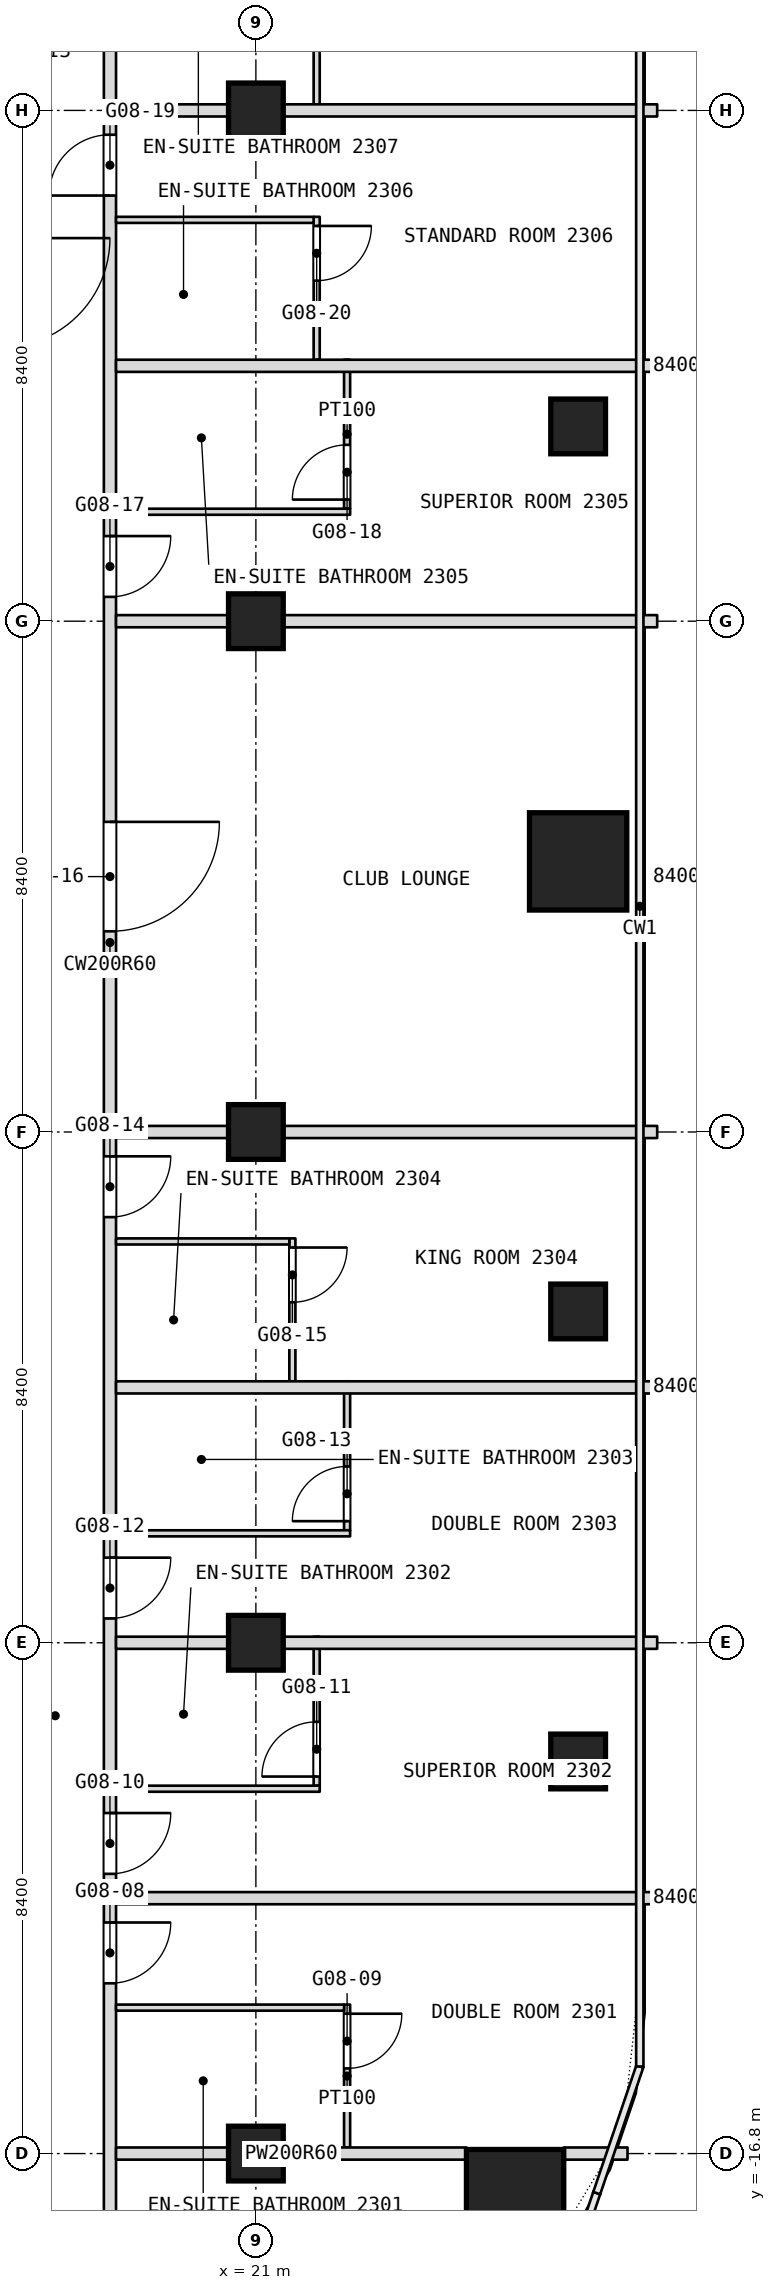
"""IFC4 building model, lengths in metres.
Left out: names, types, materials, properties, quantities, classifications, styles, units other than length and angle.
Written with IfcOpenShell. Run it as: python <this file> out.ifc"""

import sys

from ifc_helpers import new_model, si_unit, direction, frame, frame_2d, origin, origin_2d, place, context, subcontext, project, spatial, rectangle, extrude, element, fill, save


model = new_model("IFC4")
c1 = context("Model", 3, precision=1e-05, world=origin(), true_north=direction((0.0, 1.0)))
c2 = subcontext(c1, "Body", "Model", "MODEL_VIEW")
j1 = project(units=[si_unit("LENGTHUNIT", "METRE"), si_unit("PLANEANGLEUNIT", "RADIAN")], contexts=[c1])
p1 = place(None, origin())
s1 = spatial("IfcSite", under=j1, at=p1, CompositionType="ELEMENT")
p2 = place(p1, origin())
s2 = spatial("IfcBuilding", under=s1, at=p2, CompositionType="ELEMENT")
p3 = place(p2, frame((0.0, 0.0, 108.5)))
s3 = spatial("IfcBuildingStorey", under=s2, at=p3, CompositionType="ELEMENT", Elevation=108.5)
for number, where, z_axis, x_axis in (
    (1, (25.263, -17.533, 0.0), (0.0, 0.0, 1.0), (1.0, 0.0, 0.0)),
    (2, (26.3, 4.45, 0.0), (0.0, 0.0, 1.0), (1.0, 0.0, 0.0)),
):
    element("IfcColumn", number, at=place(p3, frame(where, z_axis=z_axis, x_axis=x_axis)), inside=s3, PredefinedType="COLUMN", context=c2, shape_type="SweptSolid", body=[
        extrude(rectangle(XDim=1.6, YDim=1.6, at=origin_2d()), origin(), (0.0, 0.0, 1.0), 3.6),
    ])
for number, where, z_axis, x_axis in (
    (3, (21.0, -16.8, 0.0), (0.0, 0.0, 1.0), (1.0, 0.0, 0.0)),
    (4, (21.0, -8.4, 0.0), (0.0, 0.0, 1.0), (1.0, 0.0, 0.0)),
    (5, (21.0, 0.0, 0.0), (0.0, 0.0, 1.0), (1.0, 0.0, 0.0)),
    (6, (21.0, 8.4, 0.0), (0.0, 0.0, 1.0), (1.0, 0.0, 0.0)),
    (7, (21.0, 16.8, 0.0), (0.0, 0.0, 1.0), (1.0, 0.0, 0.0)),
    (8, (26.3, 11.603, 0.0), (0.0, 0.0, 1.0), (1.0, 0.0, 0.0)),
    (9, (26.3, -2.951, 0.0), (0.0, 0.0, 1.0), (1.0, 0.0, 0.0)),
    (10, (26.3, -10.352, 0.0), (0.0, 0.0, 1.0), (1.0, 0.0, 0.0)),
):
    element("IfcColumn", number, at=place(p3, frame(where, z_axis=z_axis, x_axis=x_axis)), inside=s3, PredefinedType="COLUMN", context=c2, shape_type="SweptSolid", body=[
        extrude(rectangle(XDim=0.9, YDim=0.9, at=origin_2d()), origin(), (0.0, 0.0, 1.0), 3.6),
    ])
p4 = place(p3, frame((22.5, -16.7, 0.0), z_axis=(0.0, 0.0, 1.0), x_axis=(0.0, 1.0, 0.0)))
e11 = element("IfcWall", 11, at=p4, inside=s3, PredefinedType="PARTITIONING", context=c2, shape_type="SweptSolid", body=[
    extrude(rectangle(XDim=2.35, YDim=0.1, at=frame_2d((1.175, 0.0))), origin(), (0.0, 0.0, 1.0), 3.34),
])
p5 = place(p4, frame((1.3, 0.0, 0.0)))
e12 = element("IfcOpeningElement", 12, at=p5, cuts=e11, PredefinedType="OPENING", context=c2, shape_type="SweptSolid", body=[
    extrude(rectangle(XDim=0.9, YDim=2.1, at=frame_2d((0.45, 1.05))), frame((0.0, 0.05, 0.0), z_axis=(0.0, -1.0, 0.0), x_axis=(1.0, 0.0, 0.0)), (0.0, 0.0, 1.0), 0.1),
])
p6 = place(p3, frame((22.5, -6.55, 0.0), z_axis=(0.0, 0.0, 1.0), x_axis=(0.0, 1.0, 0.0)))
e13 = element("IfcWall", 13, at=p6, inside=s3, PredefinedType="PARTITIONING", context=c2, shape_type="SweptSolid", body=[
    extrude(rectangle(XDim=2.45, YDim=0.1, at=frame_2d((1.225, 0.0))), origin(), (0.0, 0.0, 1.0), 3.34),
])
p7 = place(p6, frame((0.15, 0.0, 0.0)))
e14 = element("IfcOpeningElement", 14, at=p7, cuts=e13, PredefinedType="OPENING", context=c2, shape_type="SweptSolid", body=[
    extrude(rectangle(XDim=0.9, YDim=2.1, at=frame_2d((0.45, 1.05))), frame((0.0, 0.05, 0.0), z_axis=(0.0, -1.0, 0.0), x_axis=(1.0, 0.0, 0.0)), (0.0, 0.0, 1.0), 0.1),
])
p8 = place(p3, frame((22.5, 10.25, 0.0), z_axis=(0.0, 0.0, 1.0), x_axis=(0.0, 1.0, 0.0)))
e15 = element("IfcWall", 15, at=p8, inside=s3, PredefinedType="PARTITIONING", context=c2, shape_type="SweptSolid", body=[
    extrude(rectangle(XDim=2.45, YDim=0.1, at=frame_2d((1.225, 0.0))), origin(), (0.0, 0.0, 1.0), 3.34),
])
p9 = place(p8, frame((0.15, 0.0, 0.0)))
e16 = element("IfcOpeningElement", 16, at=p9, cuts=e15, PredefinedType="OPENING", context=c2, shape_type="SweptSolid", body=[
    extrude(rectangle(XDim=0.9, YDim=2.1, at=frame_2d((0.45, 1.05))), frame((0.0, 0.05, 0.0), z_axis=(0.0, -1.0, 0.0), x_axis=(1.0, 0.0, 0.0)), (0.0, 0.0, 1.0), 0.1),
])
p10 = place(p3, frame((22.0, -10.75, 0.0), z_axis=(0.0, 0.0, 1.0), x_axis=(0.0, 1.0, 0.0)))
e17 = element("IfcWall", 17, at=p10, inside=s3, PredefinedType="PARTITIONING", context=c2, shape_type="SweptSolid", body=[
    extrude(rectangle(XDim=2.45, YDim=0.1, at=frame_2d((1.225, 0.0))), origin(), (0.0, 0.0, 1.0), 3.34),
])
p11 = place(p10, frame((0.15, 0.0, 0.0)))
e18 = element("IfcOpeningElement", 18, at=p11, cuts=e17, PredefinedType="OPENING", context=c2, shape_type="SweptSolid", body=[
    extrude(rectangle(XDim=0.9, YDim=2.1, at=frame_2d((0.45, 1.05))), frame((0.0, 0.05, 0.0), z_axis=(0.0, -1.0, 0.0), x_axis=(1.0, 0.0, 0.0)), (0.0, 0.0, 1.0), 0.1),
])
p12 = place(p3, frame((22.0, 12.7, 0.0), z_axis=(0.0, 0.0, 1.0), x_axis=(0.0, 1.0, 0.0)))
e19 = element("IfcWall", 19, at=p12, inside=s3, PredefinedType="PARTITIONING", context=c2, shape_type="SweptSolid", body=[
    extrude(rectangle(XDim=2.35, YDim=0.1, at=frame_2d((1.175, 0.0))), origin(), (0.0, 0.0, 1.0), 3.34),
])
p13 = place(p12, frame((1.3, 0.0, 0.0)))
e20 = element("IfcOpeningElement", 20, at=p13, cuts=e19, PredefinedType="OPENING", context=c2, shape_type="SweptSolid", body=[
    extrude(rectangle(XDim=0.9, YDim=2.1, at=frame_2d((0.45, 1.05))), frame((0.0, 0.05, 0.0), z_axis=(0.0, -1.0, 0.0), x_axis=(1.0, 0.0, 0.0)), (0.0, 0.0, 1.0), 0.1),
])
p14 = place(p3, frame((22.0, 16.9, 0.0), z_axis=(0.0, 0.0, 1.0), x_axis=(0.0, 1.0, 0.0)))
e21 = element("IfcWall", 21, at=p14, inside=s3, PredefinedType="PARTITIONING", context=c2, shape_type="SweptSolid", body=[
    extrude(rectangle(XDim=3.55, YDim=0.1, at=frame_2d((1.775, 0.0))), origin(), (0.0, 0.0, 1.0), 3.34),
])
p15 = place(p14, frame((2.5, 0.0, 0.0)))
e22 = element("IfcOpeningElement", 22, at=p15, cuts=e21, PredefinedType="OPENING", context=c2, shape_type="SweptSolid", body=[
    extrude(rectangle(XDim=0.9, YDim=2.1, at=frame_2d((0.45, 1.05))), frame((0.0, 0.05, 0.0), z_axis=(0.0, -1.0, 0.0), x_axis=(1.0, 0.0, 0.0)), (0.0, 0.0, 1.0), 0.1),
])
p16 = place(p3, frame((21.6, -4.1, 0.0), z_axis=(0.0, 0.0, 1.0), x_axis=(0.0, 1.0, 0.0)))
e23 = element("IfcWall", 23, at=p16, inside=s3, PredefinedType="PARTITIONING", context=c2, shape_type="SweptSolid", body=[
    extrude(rectangle(XDim=2.35, YDim=0.1, at=frame_2d((1.175, 0.0))), origin(), (0.0, 0.0, 1.0), 3.34),
])
p17 = place(p16, frame((1.3, 0.0, 0.0)))
e24 = element("IfcOpeningElement", 24, at=p17, cuts=e23, PredefinedType="OPENING", context=c2, shape_type="SweptSolid", body=[
    extrude(rectangle(XDim=0.9, YDim=2.1, at=frame_2d((0.45, 1.05))), frame((0.0, 0.05, 0.0), z_axis=(0.0, -1.0, 0.0), x_axis=(1.0, 0.0, 0.0)), (0.0, 0.0, 1.0), 0.1),
])
p18 = place(p3, frame((18.6, -21.708, 0.0), z_axis=(0.0, 0.0, 1.0), x_axis=(0.0, 1.0, 0.0)))
e25 = element("IfcWall", 25, at=p18, inside=s3, PredefinedType="PARTITIONING", context=c2, shape_type="SweptSolid", body=[
    extrude(rectangle(XDim=49.648, YDim=0.2, at=frame_2d((24.824, 0.0))), origin(), (0.0, 0.0, 1.0), 3.34),
])
p19 = place(p18, frame((2.204, 0.0, 0.0)))
e26 = element("IfcOpeningElement", 26, at=p19, cuts=e25, PredefinedType="OPENING", context=c2, shape_type="SweptSolid", body=[
    extrude(rectangle(XDim=1.0, YDim=2.1, at=frame_2d((0.5, 1.05))), frame((0.0, 0.1, 0.0), z_axis=(0.0, -1.0, 0.0), x_axis=(1.0, 0.0, 0.0)), (0.0, 0.0, 1.0), 0.2),
])
p20 = place(p18, frame((7.708, 0.0, 0.0)))
e27 = element("IfcOpeningElement", 27, at=p20, cuts=e25, PredefinedType="OPENING", context=c2, shape_type="SweptSolid", body=[
    extrude(rectangle(XDim=1.0, YDim=2.1, at=frame_2d((0.5, 1.05))), frame((0.0, 0.1, 0.0), z_axis=(0.0, -1.0, 0.0), x_axis=(1.0, 0.0, 0.0)), (0.0, 0.0, 1.0), 0.2),
])
p21 = place(p18, frame((9.508, 0.0, 0.0)))
e28 = element("IfcOpeningElement", 28, at=p21, cuts=e25, PredefinedType="OPENING", context=c2, shape_type="SweptSolid", body=[
    extrude(rectangle(XDim=1.0, YDim=2.1, at=frame_2d((0.5, 1.05))), frame((0.0, 0.1, 0.0), z_axis=(0.0, -1.0, 0.0), x_axis=(1.0, 0.0, 0.0)), (0.0, 0.0, 1.0), 0.2),
])
p22 = place(p18, frame((13.708, 0.0, 0.0)))
e29 = element("IfcOpeningElement", 29, at=p22, cuts=e25, PredefinedType="OPENING", context=c2, shape_type="SweptSolid", body=[
    extrude(rectangle(XDim=1.0, YDim=2.1, at=frame_2d((0.5, 1.05))), frame((0.0, 0.1, 0.0), z_axis=(0.0, -1.0, 0.0), x_axis=(1.0, 0.0, 0.0)), (0.0, 0.0, 1.0), 0.2),
])
p23 = place(p18, frame((20.308, 0.0, 0.0)))
e30 = element("IfcOpeningElement", 30, at=p23, cuts=e25, PredefinedType="OPENING", context=c2, shape_type="SweptSolid", body=[
    extrude(rectangle(XDim=1.0, YDim=2.1, at=frame_2d((0.5, 1.05))), frame((0.0, 0.1, 0.0), z_axis=(0.0, -1.0, 0.0), x_axis=(1.0, 0.0, 0.0)), (0.0, 0.0, 1.0), 0.2),
])
p24 = place(p18, frame((25.008, 0.0, 0.0)))
e31 = element("IfcOpeningElement", 31, at=p24, cuts=e25, PredefinedType="OPENING", context=c2, shape_type="SweptSolid", body=[
    extrude(rectangle(XDim=1.8, YDim=2.1, at=frame_2d((0.9, 1.05))), frame((0.0, 0.1, 0.0), z_axis=(0.0, -1.0, 0.0), x_axis=(1.0, 0.0, 0.0)), (0.0, 0.0, 1.0), 0.2),
])
p25 = place(p18, frame((30.508, 0.0, 0.0)))
e32 = element("IfcOpeningElement", 32, at=p25, cuts=e25, PredefinedType="OPENING", context=c2, shape_type="SweptSolid", body=[
    extrude(rectangle(XDim=1.0, YDim=2.1, at=frame_2d((0.5, 1.05))), frame((0.0, 0.1, 0.0), z_axis=(0.0, -1.0, 0.0), x_axis=(1.0, 0.0, 0.0)), (0.0, 0.0, 1.0), 0.2),
])
p26 = place(p18, frame((37.108, 0.0, 0.0)))
e33 = element("IfcOpeningElement", 33, at=p26, cuts=e25, PredefinedType="OPENING", context=c2, shape_type="SweptSolid", body=[
    extrude(rectangle(XDim=1.0, YDim=2.1, at=frame_2d((0.5, 1.05))), frame((0.0, 0.1, 0.0), z_axis=(0.0, -1.0, 0.0), x_axis=(1.0, 0.0, 0.0)), (0.0, 0.0, 1.0), 0.2),
])
p27 = place(p18, frame((42.608, 0.0, 0.0)))
e34 = element("IfcOpeningElement", 34, at=p27, cuts=e25, PredefinedType="OPENING", context=c2, shape_type="SweptSolid", body=[
    extrude(rectangle(XDim=1.0, YDim=2.1, at=frame_2d((0.5, 1.05))), frame((0.0, 0.1, 0.0), z_axis=(0.0, -1.0, 0.0), x_axis=(1.0, 0.0, 0.0)), (0.0, 0.0, 1.0), 0.2),
])
p28 = place(p18, frame((44.608, 0.0, 0.0)))
e35 = element("IfcOpeningElement", 35, at=p28, cuts=e25, PredefinedType="OPENING", context=c2, shape_type="SweptSolid", body=[
    extrude(rectangle(XDim=1.0, YDim=2.1, at=frame_2d((0.5, 1.05))), frame((0.0, 0.1, 0.0), z_axis=(0.0, -1.0, 0.0), x_axis=(1.0, 0.0, 0.0)), (0.0, 0.0, 1.0), 0.2),
])
p29 = place(p3, frame((18.7, -16.8, 0.0), z_axis=(0.0, 0.0, 1.0), x_axis=(1.0, 0.0, 0.0)))
e36 = element("IfcWall", 36, at=p29, inside=s3, PredefinedType="PARTITIONING", context=c2, shape_type="SweptSolid", body=[
    extrude(rectangle(XDim=5.763, YDim=0.2, at=frame_2d((2.881, 0.0))), origin(), (0.0, 0.0, 1.0), 2.89),
])
p30 = place(p3, frame((26.063, -16.8, 0.0), z_axis=(0.0, 0.0, 1.0), x_axis=(1.0, 0.0, 0.0)))
e37 = element("IfcWall", 37, at=p30, inside=s3, PredefinedType="PARTITIONING", context=c2, shape_type="SweptSolid", body=[
    extrude(rectangle(XDim=1.049, YDim=0.2, at=frame_2d((0.524, 0.0))), origin(), (0.0, 0.0, 1.0), 3.34),
])
p31 = place(p3, frame((18.7, -14.4, 0.0), z_axis=(0.0, 0.0, 1.0), x_axis=(1.0, 0.0, 0.0)))
e38 = element("IfcWall", 38, at=p31, inside=s3, PredefinedType="PARTITIONING", context=c2, shape_type="SweptSolid", body=[
    extrude(rectangle(XDim=3.75, YDim=0.1, at=frame_2d((1.875, 0.0))), origin(), (0.0, 0.0, 1.0), 3.34),
])
p32 = place(p3, frame((18.7, -12.6, 0.0), z_axis=(0.0, 0.0, 1.0), x_axis=(1.0, 0.0, 0.0)))
e39 = element("IfcWall", 39, at=p32, inside=s3, PredefinedType="PARTITIONING", context=c2, shape_type="SweptSolid", body=[
    extrude(rectangle(XDim=8.9, YDim=0.2, at=frame_2d((4.45, 0.0))), origin(), (0.0, 0.0, 1.0), 3.34),
])
p33 = place(p3, frame((18.7, -10.8, 0.0), z_axis=(0.0, 0.0, 1.0), x_axis=(1.0, 0.0, 0.0)))
e40 = element("IfcWall", 40, at=p33, inside=s3, PredefinedType="PARTITIONING", context=c2, shape_type="SweptSolid", body=[
    extrude(rectangle(XDim=3.35, YDim=0.1, at=frame_2d((1.675, 0.0))), origin(), (0.0, 0.0, 1.0), 3.34),
])
p34 = place(p3, frame((18.7, -8.4, 0.0), z_axis=(0.0, 0.0, 1.0), x_axis=(1.0, 0.0, 0.0)))
e41 = element("IfcWall", 41, at=p34, inside=s3, PredefinedType="PARTITIONING", context=c2, shape_type="SweptSolid", body=[
    extrude(rectangle(XDim=8.9, YDim=0.2, at=frame_2d((4.45, 0.0))), origin(), (0.0, 0.0, 1.0), 2.89),
])
p35 = place(p3, frame((18.7, -6.6, 0.0), z_axis=(0.0, 0.0, 1.0), x_axis=(1.0, 0.0, 0.0)))
e42 = element("IfcWall", 42, at=p35, inside=s3, PredefinedType="PARTITIONING", context=c2, shape_type="SweptSolid", body=[
    extrude(rectangle(XDim=3.85, YDim=0.1, at=frame_2d((1.925, 0.0))), origin(), (0.0, 0.0, 1.0), 3.34),
])
p36 = place(p3, frame((18.7, -4.2, 0.0), z_axis=(0.0, 0.0, 1.0), x_axis=(1.0, 0.0, 0.0)))
e43 = element("IfcWall", 43, at=p36, inside=s3, PredefinedType="PARTITIONING", context=c2, shape_type="SweptSolid", body=[
    extrude(rectangle(XDim=8.9, YDim=0.2, at=frame_2d((4.45, 0.0))), origin(), (0.0, 0.0, 1.0), 3.34),
])
p37 = place(p3, frame((18.7, -1.8, 0.0), z_axis=(0.0, 0.0, 1.0), x_axis=(1.0, 0.0, 0.0)))
e44 = element("IfcWall", 44, at=p37, inside=s3, PredefinedType="PARTITIONING", context=c2, shape_type="SweptSolid", body=[
    extrude(rectangle(XDim=2.85, YDim=0.1, at=frame_2d((1.425, 0.0))), origin(), (0.0, 0.0, 1.0), 3.34),
])
for number, where, z_axis, x_axis in (
    (45, (18.7, 0.0, 0.0), (0.0, 0.0, 1.0), (1.0, 0.0, 0.0)),
    (46, (18.7, 8.4, 0.0), (0.0, 0.0, 1.0), (1.0, 0.0, 0.0)),
):
    element("IfcWall", number, at=place(p3, frame(where, z_axis=z_axis, x_axis=x_axis)), inside=s3, PredefinedType="PARTITIONING", context=c2, shape_type="SweptSolid", body=[
        extrude(rectangle(XDim=8.9, YDim=0.2, at=frame_2d((4.45, 0.0))), origin(), (0.0, 0.0, 1.0), 2.89),
    ])
p38 = place(p3, frame((18.7, 10.2, 0.0), z_axis=(0.0, 0.0, 1.0), x_axis=(1.0, 0.0, 0.0)))
e47 = element("IfcWall", 47, at=p38, inside=s3, PredefinedType="PARTITIONING", context=c2, shape_type="SweptSolid", body=[
    extrude(rectangle(XDim=3.85, YDim=0.1, at=frame_2d((1.925, 0.0))), origin(), (0.0, 0.0, 1.0), 3.34),
])
p39 = place(p3, frame((18.7, 12.6, 0.0), z_axis=(0.0, 0.0, 1.0), x_axis=(1.0, 0.0, 0.0)))
e48 = element("IfcWall", 48, at=p39, inside=s3, PredefinedType="PARTITIONING", context=c2, shape_type="SweptSolid", body=[
    extrude(rectangle(XDim=8.9, YDim=0.2, at=frame_2d((4.45, 0.0))), origin(), (0.0, 0.0, 1.0), 3.34),
])
p40 = place(p3, frame((18.7, 15.0, 0.0), z_axis=(0.0, 0.0, 1.0), x_axis=(1.0, 0.0, 0.0)))
e49 = element("IfcWall", 49, at=p40, inside=s3, PredefinedType="PARTITIONING", context=c2, shape_type="SweptSolid", body=[
    extrude(rectangle(XDim=3.25, YDim=0.1, at=frame_2d((1.625, 0.0))), origin(), (0.0, 0.0, 1.0), 3.34),
])
p41 = place(p3, frame((18.7, 16.8, 0.0), z_axis=(0.0, 0.0, 1.0), x_axis=(1.0, 0.0, 0.0)))
e50 = element("IfcWall", 50, at=p41, inside=s3, PredefinedType="PARTITIONING", context=c2, shape_type="SweptSolid", body=[
    extrude(rectangle(XDim=8.9, YDim=0.2, at=frame_2d((4.45, 0.0))), origin(), (0.0, 0.0, 1.0), 2.89),
])
p42 = place(p5, origin())
e51 = element("IfcDoor", 51, at=p42, inside=s3, OperationType="SINGLE_SWING_RIGHT", PredefinedType="DOOR", context=c2, shape_type="SweptSolid", body=[
    extrude(rectangle(XDim=0.9, YDim=2.1, at=frame_2d((0.45, 1.05))), frame((0.0, 0.025, 0.0), z_axis=(0.0, -1.0, 0.0), x_axis=(1.0, 0.0, 0.0)), (0.0, 0.0, 1.0), 0.05),
])
fill(e12, e51)
p43 = place(p7, origin())
e52 = element("IfcDoor", 52, at=p43, inside=s3, OperationType="SINGLE_SWING_LEFT", PredefinedType="DOOR", context=c2, shape_type="SweptSolid", body=[
    extrude(rectangle(XDim=0.9, YDim=2.1, at=frame_2d((0.45, 1.05))), frame((0.0, 0.025, 0.0), z_axis=(0.0, -1.0, 0.0), x_axis=(1.0, 0.0, 0.0)), (0.0, 0.0, 1.0), 0.05),
])
fill(e14, e52)
p44 = place(p9, origin())
e53 = element("IfcDoor", 53, at=p44, inside=s3, OperationType="SINGLE_SWING_LEFT", PredefinedType="DOOR", context=c2, shape_type="SweptSolid", body=[
    extrude(rectangle(XDim=0.9, YDim=2.1, at=frame_2d((0.45, 1.05))), frame((0.0, 0.025, 0.0), z_axis=(0.0, -1.0, 0.0), x_axis=(1.0, 0.0, 0.0)), (0.0, 0.0, 1.0), 0.05),
])
fill(e16, e53)
p45 = place(p11, origin())
e54 = element("IfcDoor", 54, at=p45, inside=s3, OperationType="SINGLE_SWING_LEFT", PredefinedType="DOOR", context=c2, shape_type="SweptSolid", body=[
    extrude(rectangle(XDim=0.9, YDim=2.1, at=frame_2d((0.45, 1.05))), frame((0.0, 0.025, 0.0), z_axis=(0.0, -1.0, 0.0), x_axis=(1.0, 0.0, 0.0)), (0.0, 0.0, 1.0), 0.05),
])
fill(e18, e54)
p46 = place(p13, origin())
e55 = element("IfcDoor", 55, at=p46, inside=s3, OperationType="SINGLE_SWING_RIGHT", PredefinedType="DOOR", context=c2, shape_type="SweptSolid", body=[
    extrude(rectangle(XDim=0.9, YDim=2.1, at=frame_2d((0.45, 1.05))), frame((0.0, 0.025, 0.0), z_axis=(0.0, -1.0, 0.0), x_axis=(1.0, 0.0, 0.0)), (0.0, 0.0, 1.0), 0.05),
])
fill(e20, e55)
p47 = place(p17, origin())
e56 = element("IfcDoor", 56, at=p47, inside=s3, OperationType="SINGLE_SWING_RIGHT", PredefinedType="DOOR", context=c2, shape_type="SweptSolid", body=[
    extrude(rectangle(XDim=0.9, YDim=2.1, at=frame_2d((0.45, 1.05))), frame((0.0, 0.025, 0.0), z_axis=(0.0, -1.0, 0.0), x_axis=(1.0, 0.0, 0.0)), (0.0, 0.0, 1.0), 0.05),
])
fill(e24, e56)
p48 = place(p20, origin())
e57 = element("IfcDoor", 57, at=p48, inside=s3, OperationType="SINGLE_SWING_RIGHT", PredefinedType="DOOR", context=c2, shape_type="SweptSolid", body=[
    extrude(rectangle(XDim=1.0, YDim=2.1, at=frame_2d((0.5, 1.05))), frame((0.0, 0.025, 0.0), z_axis=(0.0, -1.0, 0.0), x_axis=(1.0, 0.0, 0.0)), (0.0, 0.0, 1.0), 0.05),
])
fill(e27, e57)
p49 = place(p21, origin())
e58 = element("IfcDoor", 58, at=p49, inside=s3, OperationType="SINGLE_SWING_RIGHT", PredefinedType="DOOR", context=c2, shape_type="SweptSolid", body=[
    extrude(rectangle(XDim=1.0, YDim=2.1, at=frame_2d((0.5, 1.05))), frame((0.0, 0.025, 0.0), z_axis=(0.0, -1.0, 0.0), x_axis=(1.0, 0.0, 0.0)), (0.0, 0.0, 1.0), 0.05),
])
fill(e28, e58)
p50 = place(p22, origin())
e59 = element("IfcDoor", 59, at=p50, inside=s3, OperationType="SINGLE_SWING_RIGHT", PredefinedType="DOOR", context=c2, shape_type="SweptSolid", body=[
    extrude(rectangle(XDim=1.0, YDim=2.1, at=frame_2d((0.5, 1.05))), frame((0.0, 0.025, 0.0), z_axis=(0.0, -1.0, 0.0), x_axis=(1.0, 0.0, 0.0)), (0.0, 0.0, 1.0), 0.05),
])
fill(e29, e59)
p51 = place(p23, origin())
e60 = element("IfcDoor", 60, at=p51, inside=s3, OperationType="SINGLE_SWING_RIGHT", PredefinedType="DOOR", context=c2, shape_type="SweptSolid", body=[
    extrude(rectangle(XDim=1.0, YDim=2.1, at=frame_2d((0.5, 1.05))), frame((0.0, 0.025, 0.0), z_axis=(0.0, -1.0, 0.0), x_axis=(1.0, 0.0, 0.0)), (0.0, 0.0, 1.0), 0.05),
])
fill(e30, e60)
p52 = place(p24, origin())
e61 = element("IfcDoor", 61, at=p52, inside=s3, OperationType="DOUBLE_DOOR_SINGLE_SWING", PredefinedType="DOOR", context=c2, shape_type="SweptSolid", body=[
    extrude(rectangle(XDim=1.8, YDim=2.1, at=frame_2d((0.9, 1.05))), frame((0.0, 0.025, 0.0), z_axis=(0.0, -1.0, 0.0), x_axis=(1.0, 0.0, 0.0)), (0.0, 0.0, 1.0), 0.05),
])
fill(e31, e61)
p53 = place(p25, origin())
e62 = element("IfcDoor", 62, at=p53, inside=s3, OperationType="SINGLE_SWING_LEFT", PredefinedType="DOOR", context=c2, shape_type="SweptSolid", body=[
    extrude(rectangle(XDim=1.0, YDim=2.1, at=frame_2d((0.5, 1.05))), frame((0.0, 0.025, 0.0), z_axis=(0.0, -1.0, 0.0), x_axis=(1.0, 0.0, 0.0)), (0.0, 0.0, 1.0), 0.05),
])
fill(e32, e62)
p54 = place(p26, origin())
e63 = element("IfcDoor", 63, at=p54, inside=s3, OperationType="SINGLE_SWING_LEFT", PredefinedType="DOOR", context=c2, shape_type="SweptSolid", body=[
    extrude(rectangle(XDim=1.0, YDim=2.1, at=frame_2d((0.5, 1.05))), frame((0.0, 0.025, 0.0), z_axis=(0.0, -1.0, 0.0), x_axis=(1.0, 0.0, 0.0)), (0.0, 0.0, 1.0), 0.05),
])
fill(e33, e63)
save(model, sys.argv[1])
